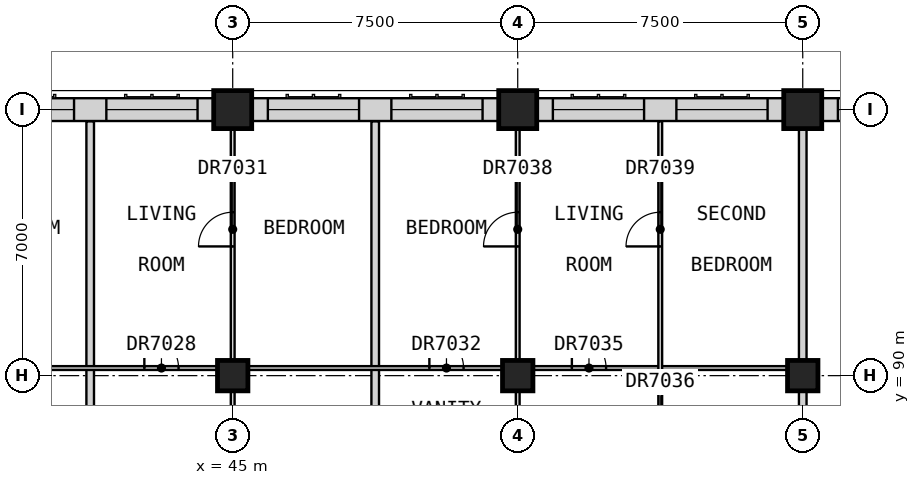
"""IFC4 building model, lengths in metres.
Left out: names, types, materials, properties, quantities, classifications, styles, units other than length and angle.
Written with IfcOpenShell. Run it as: python <this file> out.ifc"""

import sys

from ifc_helpers import new_model, si_unit, direction, frame, frame_2d, origin, origin_2d, place, context, subcontext, project, spatial, rectangle, extrude, element, fill, save


model = new_model("IFC4")
c1 = context("Model", 3, precision=1e-05, world=origin(), true_north=direction((0.0, 1.0)))
c2 = subcontext(c1, "Body", "Model", "MODEL_VIEW")
j1 = project(units=[si_unit("LENGTHUNIT", "METRE"), si_unit("PLANEANGLEUNIT", "RADIAN")], contexts=[c1])
p1 = place(None, origin())
s1 = spatial("IfcSite", under=j1, at=p1, CompositionType="ELEMENT")
p2 = place(p1, origin())
s2 = spatial("IfcBuilding", under=s1, at=p2, CompositionType="ELEMENT")
p3 = place(p2, frame((0.0, 0.0, 230.2)))
s3 = spatial("IfcBuildingStorey", under=s2, at=p3, CompositionType="ELEMENT", Elevation=230.2)
p4 = place(p3, frame((45.0, 90.0, 0.0), z_axis=(0.0, 0.0, 1.0), x_axis=(1.0, 0.0, 0.0)))
e1 = element("IfcColumn", 1, at=p4, inside=s3, PredefinedType="COLUMN", context=c2, shape_type="SweptSolid", body=[
    extrude(rectangle(XDim=0.8, YDim=0.8, at=origin_2d()), origin(), (0.0, 0.0, 1.0), 3.5),
])
p5 = place(p3, frame((45.0, 97.0, 0.0), z_axis=(0.0, 0.0, 1.0), x_axis=(1.0, 0.0, 0.0)))
e2 = element("IfcColumn", 2, at=p5, inside=s3, PredefinedType="COLUMN", context=c2, shape_type="SweptSolid", body=[
    extrude(rectangle(XDim=1.0, YDim=1.0, at=origin_2d()), origin(), (0.0, 0.0, 1.0), 3.5),
])
p6 = place(p3, frame((52.5, 90.0, 0.0), z_axis=(0.0, 0.0, 1.0), x_axis=(1.0, 0.0, 0.0)))
e3 = element("IfcColumn", 3, at=p6, inside=s3, PredefinedType="COLUMN", context=c2, shape_type="SweptSolid", body=[
    extrude(rectangle(XDim=0.8, YDim=0.8, at=origin_2d()), origin(), (0.0, 0.0, 1.0), 3.5),
])
p7 = place(p3, frame((52.5, 97.0, 0.0), z_axis=(0.0, 0.0, 1.0), x_axis=(1.0, 0.0, 0.0)))
e4 = element("IfcColumn", 4, at=p7, inside=s3, PredefinedType="COLUMN", context=c2, shape_type="SweptSolid", body=[
    extrude(rectangle(XDim=1.0, YDim=1.0, at=origin_2d()), origin(), (0.0, 0.0, 1.0), 3.5),
])
p8 = place(p3, frame((60.0, 90.0, 0.0), z_axis=(0.0, 0.0, 1.0), x_axis=(1.0, 0.0, 0.0)))
e5 = element("IfcColumn", 5, at=p8, inside=s3, PredefinedType="COLUMN", context=c2, shape_type="SweptSolid", body=[
    extrude(rectangle(XDim=0.8, YDim=0.8, at=origin_2d()), origin(), (0.0, 0.0, 1.0), 3.5),
])
p9 = place(p3, frame((60.0, 97.0, 0.0), z_axis=(0.0, 0.0, 1.0), x_axis=(1.0, 0.0, 0.0)))
e6 = element("IfcColumn", 6, at=p9, inside=s3, PredefinedType="COLUMN", context=c2, shape_type="SweptSolid", body=[
    extrude(rectangle(XDim=1.0, YDim=1.0, at=origin_2d()), origin(), (0.0, 0.0, 1.0), 3.5),
])
p10 = place(p3, frame((67.0, 97.0, 0.0), z_axis=(0.0, 0.0, 1.0), x_axis=(-1.0, 0.0, 0.0)))
e7 = element("IfcWall", 7, at=p10, inside=s3, PredefinedType="SOLIDWALL", context=c2, shape_type="SweptSolid", body=[
    extrude(rectangle(XDim=6.5, YDim=0.6, at=frame_2d((3.25, 0.0))), origin(), (0.0, 0.0, 1.0), 2.75),
])
p11 = place(p10, frame((3.675, 0.0, 0.8)))
e8 = element("IfcOpeningElement", 8, at=p11, cuts=e7, PredefinedType="OPENING", context=c2, shape_type="SweptSolid", body=[
    extrude(rectangle(XDim=2.4, YDim=1.8, at=frame_2d((1.2, 0.9))), frame((0.0, 0.31, 0.0), z_axis=(0.0, -1.0, 0.0), x_axis=(1.0, 0.0, 0.0)), (0.0, 0.0, 1.0), 0.62),
])
p12 = place(p10, frame((0.425, 0.0, 0.8)))
e9 = element("IfcOpeningElement", 9, at=p12, cuts=e7, PredefinedType="OPENING", context=c2, shape_type="SweptSolid", body=[
    extrude(rectangle(XDim=2.4, YDim=1.8, at=frame_2d((1.2, 0.9))), frame((0.0, 0.31, 0.0), z_axis=(0.0, -1.0, 0.0), x_axis=(1.0, 0.0, 0.0)), (0.0, 0.0, 1.0), 0.62),
])
p13 = place(p3, frame((59.5, 97.0, 0.0), z_axis=(0.0, 0.0, 1.0), x_axis=(-1.0, 0.0, 0.0)))
e10 = element("IfcWall", 10, at=p13, inside=s3, PredefinedType="SOLIDWALL", context=c2, shape_type="SweptSolid", body=[
    extrude(rectangle(XDim=6.5, YDim=0.6, at=frame_2d((3.25, 0.0))), origin(), (0.0, 0.0, 1.0), 2.75),
])
p14 = place(p13, frame((3.675, 0.0, 0.8)))
e11 = element("IfcOpeningElement", 11, at=p14, cuts=e10, PredefinedType="OPENING", context=c2, shape_type="SweptSolid", body=[
    extrude(rectangle(XDim=2.4, YDim=1.8, at=frame_2d((1.2, 0.9))), frame((0.0, 0.31, 0.0), z_axis=(0.0, -1.0, 0.0), x_axis=(1.0, 0.0, 0.0)), (0.0, 0.0, 1.0), 0.62),
])
p15 = place(p13, frame((0.425, 0.0, 0.8)))
e12 = element("IfcOpeningElement", 12, at=p15, cuts=e10, PredefinedType="OPENING", context=c2, shape_type="SweptSolid", body=[
    extrude(rectangle(XDim=2.4, YDim=1.8, at=frame_2d((1.2, 0.9))), frame((0.0, 0.31, 0.0), z_axis=(0.0, -1.0, 0.0), x_axis=(1.0, 0.0, 0.0)), (0.0, 0.0, 1.0), 0.62),
])
p16 = place(p3, frame((52.0, 97.0, 0.0), z_axis=(0.0, 0.0, 1.0), x_axis=(-1.0, 0.0, 0.0)))
e13 = element("IfcWall", 13, at=p16, inside=s3, PredefinedType="SOLIDWALL", context=c2, shape_type="SweptSolid", body=[
    extrude(rectangle(XDim=6.5, YDim=0.6, at=frame_2d((3.25, 0.0))), origin(), (0.0, 0.0, 1.0), 2.75),
])
p17 = place(p16, frame((3.675, 0.0, 0.8)))
e14 = element("IfcOpeningElement", 14, at=p17, cuts=e13, PredefinedType="OPENING", context=c2, shape_type="SweptSolid", body=[
    extrude(rectangle(XDim=2.4, YDim=1.8, at=frame_2d((1.2, 0.9))), frame((0.0, 0.31, 0.0), z_axis=(0.0, -1.0, 0.0), x_axis=(1.0, 0.0, 0.0)), (0.0, 0.0, 1.0), 0.62),
])
p18 = place(p16, frame((0.425, 0.0, 0.8)))
e15 = element("IfcOpeningElement", 15, at=p18, cuts=e13, PredefinedType="OPENING", context=c2, shape_type="SweptSolid", body=[
    extrude(rectangle(XDim=2.4, YDim=1.8, at=frame_2d((1.2, 0.9))), frame((0.0, 0.31, 0.0), z_axis=(0.0, -1.0, 0.0), x_axis=(1.0, 0.0, 0.0)), (0.0, 0.0, 1.0), 0.62),
])
p19 = place(p3, frame((44.5, 97.0, 0.0), z_axis=(0.0, 0.0, 1.0), x_axis=(-1.0, 0.0, 0.0)))
e16 = element("IfcWall", 16, at=p19, inside=s3, PredefinedType="SOLIDWALL", context=c2, shape_type="SweptSolid", body=[
    extrude(rectangle(XDim=6.5, YDim=0.6, at=frame_2d((3.25, 0.0))), origin(), (0.0, 0.0, 1.0), 2.75),
])
p20 = place(p19, frame((3.675, 0.0, 0.8)))
e17 = element("IfcOpeningElement", 17, at=p20, cuts=e16, PredefinedType="OPENING", context=c2, shape_type="SweptSolid", body=[
    extrude(rectangle(XDim=2.4, YDim=1.8, at=frame_2d((1.2, 0.9))), frame((0.0, 0.31, 0.0), z_axis=(0.0, -1.0, 0.0), x_axis=(1.0, 0.0, 0.0)), (0.0, 0.0, 1.0), 0.62),
])
p21 = place(p19, frame((0.425, 0.0, 0.8)))
e18 = element("IfcOpeningElement", 18, at=p21, cuts=e16, PredefinedType="OPENING", context=c2, shape_type="SweptSolid", body=[
    extrude(rectangle(XDim=2.4, YDim=1.8, at=frame_2d((1.2, 0.9))), frame((0.0, 0.31, 0.0), z_axis=(0.0, -1.0, 0.0), x_axis=(1.0, 0.0, 0.0)), (0.0, 0.0, 1.0), 0.62),
])
for number, where, z_axis, x_axis in (
    (19, (41.25, 84.375, 0.0), (0.0, 0.0, 1.0), (0.0, 1.0, 0.0)),
    (20, (48.75, 84.375, 0.0), (0.0, 0.0, 1.0), (0.0, 1.0, 0.0)),
):
    element("IfcWall", number, at=place(p3, frame(where, z_axis=z_axis, x_axis=x_axis)), inside=s3, PredefinedType="PARTITIONING", context=c2, shape_type="SweptSolid", body=[
        extrude(rectangle(XDim=12.315, YDim=0.2, at=frame_2d((6.157, 0.0))), origin(), (0.0, 0.0, 1.0), 3.25),
    ])
p22 = place(p3, frame((60.0, 84.375, 0.0), z_axis=(0.0, 0.0, 1.0), x_axis=(0.0, 1.0, 0.0)))
e21 = element("IfcWall", 21, at=p22, inside=s3, PredefinedType="PARTITIONING", context=c2, shape_type="SweptSolid", body=[
    extrude(rectangle(XDim=13.125, YDim=0.2, at=frame_2d((6.562, 0.0))), origin(), (0.0, 0.0, 1.0), 3.25),
])
p23 = place(p3, frame((33.85, 90.2, 0.0), z_axis=(0.0, 0.0, 1.0), x_axis=(1.0, 0.0, 0.0)))
e22 = element("IfcWall", 22, at=p23, inside=s3, PredefinedType="PARTITIONING", context=c2, shape_type="SweptSolid", body=[
    extrude(rectangle(XDim=26.05, YDim=0.1, at=frame_2d((13.025, 0.0))), origin(), (0.0, 0.0, 1.0), 3.25),
])
p24 = place(p23, frame((0.175, 0.0, 0.0)))
e23 = element("IfcOpeningElement", 23, at=p24, cuts=e22, PredefinedType="OPENING", context=c2, shape_type="SweptSolid", body=[
    extrude(rectangle(XDim=0.9, YDim=2.1, at=frame_2d((0.45, 1.05))), frame((0.0, 0.06, 0.0), z_axis=(0.0, -1.0, 0.0), x_axis=(1.0, 0.0, 0.0)), (0.0, 0.0, 1.0), 0.12),
])
p25 = place(p23, frame((8.825, 0.0, 0.0)))
e24 = element("IfcOpeningElement", 24, at=p25, cuts=e22, PredefinedType="OPENING", context=c2, shape_type="SweptSolid", body=[
    extrude(rectangle(XDim=0.9, YDim=2.1, at=frame_2d((0.45, 1.05))), frame((0.0, 0.06, 0.0), z_axis=(0.0, -1.0, 0.0), x_axis=(1.0, 0.0, 0.0)), (0.0, 0.0, 1.0), 0.12),
])
p26 = place(p23, frame((16.325, 0.0, 0.0)))
e25 = element("IfcOpeningElement", 25, at=p26, cuts=e22, PredefinedType="OPENING", context=c2, shape_type="SweptSolid", body=[
    extrude(rectangle(XDim=0.9, YDim=2.1, at=frame_2d((0.45, 1.05))), frame((0.0, 0.06, 0.0), z_axis=(0.0, -1.0, 0.0), x_axis=(1.0, 0.0, 0.0)), (0.0, 0.0, 1.0), 0.12),
])
p27 = place(p23, frame((20.075, 0.0, 0.0)))
e26 = element("IfcOpeningElement", 26, at=p27, cuts=e22, PredefinedType="OPENING", context=c2, shape_type="SweptSolid", body=[
    extrude(rectangle(XDim=0.9, YDim=2.1, at=frame_2d((0.45, 1.05))), frame((0.0, 0.06, 0.0), z_axis=(0.0, -1.0, 0.0), x_axis=(1.0, 0.0, 0.0)), (0.0, 0.0, 1.0), 0.12),
])
p28 = place(p3, frame((45.0, 87.312, 0.0), z_axis=(0.0, 0.0, 1.0), x_axis=(0.0, 1.0, 0.0)))
e27 = element("IfcWall", 27, at=p28, inside=s3, PredefinedType="PARTITIONING", context=c2, shape_type="SweptSolid", body=[
    extrude(rectangle(XDim=10.188, YDim=0.1, at=frame_2d((5.094, 0.0))), origin(), (0.0, 0.0, 1.0), 3.25),
])
p29 = place(p28, frame((0.962, 0.0, 0.0)))
e28 = element("IfcOpeningElement", 28, at=p29, cuts=e27, PredefinedType="OPENING", context=c2, shape_type="SweptSolid", body=[
    extrude(rectangle(XDim=0.9, YDim=2.1, at=frame_2d((0.45, 1.05))), frame((0.0, 0.06, 0.0), z_axis=(0.0, -1.0, 0.0), x_axis=(1.0, 0.0, 0.0)), (0.0, 0.0, 1.0), 0.12),
])
p30 = place(p28, frame((6.087, 0.0, 0.0)))
e29 = element("IfcOpeningElement", 29, at=p30, cuts=e27, PredefinedType="OPENING", context=c2, shape_type="SweptSolid", body=[
    extrude(rectangle(XDim=0.9, YDim=2.1, at=frame_2d((0.45, 1.05))), frame((0.0, 0.06, 0.0), z_axis=(0.0, -1.0, 0.0), x_axis=(1.0, 0.0, 0.0)), (0.0, 0.0, 1.0), 0.12),
])
p31 = place(p3, frame((52.5, 87.312, 0.0), z_axis=(0.0, 0.0, 1.0), x_axis=(0.0, 1.0, 0.0)))
e30 = element("IfcWall", 30, at=p31, inside=s3, PredefinedType="PARTITIONING", context=c2, shape_type="SweptSolid", body=[
    extrude(rectangle(XDim=10.188, YDim=0.1, at=frame_2d((5.094, 0.0))), origin(), (0.0, 0.0, 1.0), 3.25),
])
p32 = place(p31, frame((6.087, 0.0, 0.0)))
e31 = element("IfcOpeningElement", 31, at=p32, cuts=e30, PredefinedType="OPENING", context=c2, shape_type="SweptSolid", body=[
    extrude(rectangle(XDim=0.9, YDim=2.1, at=frame_2d((0.45, 1.05))), frame((0.0, 0.06, 0.0), z_axis=(0.0, -1.0, 0.0), x_axis=(1.0, 0.0, 0.0)), (0.0, 0.0, 1.0), 0.12),
])
p33 = place(p3, frame((56.25, 87.312, 0.0), z_axis=(0.0, 0.0, 1.0), x_axis=(0.0, 1.0, 0.0)))
e32 = element("IfcWall", 32, at=p33, inside=s3, PredefinedType="PARTITIONING", context=c2, shape_type="SweptSolid", body=[
    extrude(rectangle(XDim=9.377, YDim=0.1, at=frame_2d((4.689, 0.0))), origin(), (0.0, 0.0, 1.0), 3.25),
])
p34 = place(p33, frame((0.962, 0.0, 0.0)))
e33 = element("IfcOpeningElement", 33, at=p34, cuts=e32, PredefinedType="OPENING", context=c2, shape_type="SweptSolid", body=[
    extrude(rectangle(XDim=0.9, YDim=2.1, at=frame_2d((0.45, 1.05))), frame((0.0, 0.06, 0.0), z_axis=(0.0, -1.0, 0.0), x_axis=(1.0, 0.0, 0.0)), (0.0, 0.0, 1.0), 0.12),
])
p35 = place(p33, frame((6.087, 0.0, 0.0)))
e34 = element("IfcOpeningElement", 34, at=p35, cuts=e32, PredefinedType="OPENING", context=c2, shape_type="SweptSolid", body=[
    extrude(rectangle(XDim=0.9, YDim=2.1, at=frame_2d((0.45, 1.05))), frame((0.0, 0.06, 0.0), z_axis=(0.0, -1.0, 0.0), x_axis=(1.0, 0.0, 0.0)), (0.0, 0.0, 1.0), 0.12),
])
p36 = place(p11, origin())
e35 = element("IfcWindow", 35, at=p36, inside=s3, PartitioningType="SINGLE_PANEL", PredefinedType="WINDOW", context=c2, shape_type="SweptSolid", body=[
    extrude(rectangle(XDim=2.4, YDim=1.8, at=frame_2d((1.2, 0.9))), frame((0.0, -0.07, 0.0), z_axis=(0.0, -1.0, 0.0), x_axis=(1.0, 0.0, 0.0)), (0.0, 0.0, 1.0), 0.06),
])
fill(e8, e35)
p37 = place(p14, origin())
e36 = element("IfcWindow", 36, at=p37, inside=s3, PartitioningType="SINGLE_PANEL", PredefinedType="WINDOW", context=c2, shape_type="SweptSolid", body=[
    extrude(rectangle(XDim=2.4, YDim=1.8, at=frame_2d((1.2, 0.9))), frame((0.0, -0.07, 0.0), z_axis=(0.0, -1.0, 0.0), x_axis=(1.0, 0.0, 0.0)), (0.0, 0.0, 1.0), 0.06),
])
fill(e11, e36)
p38 = place(p15, origin())
e37 = element("IfcWindow", 37, at=p38, inside=s3, PartitioningType="SINGLE_PANEL", PredefinedType="WINDOW", context=c2, shape_type="SweptSolid", body=[
    extrude(rectangle(XDim=2.4, YDim=1.8, at=frame_2d((1.2, 0.9))), frame((0.0, -0.07, 0.0), z_axis=(0.0, -1.0, 0.0), x_axis=(1.0, 0.0, 0.0)), (0.0, 0.0, 1.0), 0.06),
])
fill(e12, e37)
p39 = place(p17, origin())
e38 = element("IfcWindow", 38, at=p39, inside=s3, PartitioningType="SINGLE_PANEL", PredefinedType="WINDOW", context=c2, shape_type="SweptSolid", body=[
    extrude(rectangle(XDim=2.4, YDim=1.8, at=frame_2d((1.2, 0.9))), frame((0.0, -0.07, 0.0), z_axis=(0.0, -1.0, 0.0), x_axis=(1.0, 0.0, 0.0)), (0.0, 0.0, 1.0), 0.06),
])
fill(e14, e38)
p40 = place(p18, origin())
e39 = element("IfcWindow", 39, at=p40, inside=s3, PartitioningType="SINGLE_PANEL", PredefinedType="WINDOW", context=c2, shape_type="SweptSolid", body=[
    extrude(rectangle(XDim=2.4, YDim=1.8, at=frame_2d((1.2, 0.9))), frame((0.0, -0.07, 0.0), z_axis=(0.0, -1.0, 0.0), x_axis=(1.0, 0.0, 0.0)), (0.0, 0.0, 1.0), 0.06),
])
fill(e15, e39)
p41 = place(p20, origin())
e40 = element("IfcWindow", 40, at=p41, inside=s3, PartitioningType="SINGLE_PANEL", PredefinedType="WINDOW", context=c2, shape_type="SweptSolid", body=[
    extrude(rectangle(XDim=2.4, YDim=1.8, at=frame_2d((1.2, 0.9))), frame((0.0, -0.07, 0.0), z_axis=(0.0, -1.0, 0.0), x_axis=(1.0, 0.0, 0.0)), (0.0, 0.0, 1.0), 0.06),
])
fill(e17, e40)
p42 = place(p21, origin())
e41 = element("IfcWindow", 41, at=p42, inside=s3, PartitioningType="SINGLE_PANEL", PredefinedType="WINDOW", context=c2, shape_type="SweptSolid", body=[
    extrude(rectangle(XDim=2.4, YDim=1.8, at=frame_2d((1.2, 0.9))), frame((0.0, -0.07, 0.0), z_axis=(0.0, -1.0, 0.0), x_axis=(1.0, 0.0, 0.0)), (0.0, 0.0, 1.0), 0.06),
])
fill(e18, e41)
p43 = place(p25, origin())
e42 = element("IfcDoor", 42, at=p43, inside=s3, OperationType="SINGLE_SWING_RIGHT", PredefinedType="DOOR", context=c2, shape_type="SweptSolid", body=[
    extrude(rectangle(XDim=0.9, YDim=2.1, at=frame_2d((0.45, 1.05))), frame((0.0, 0.025, 0.0), z_axis=(0.0, -1.0, 0.0), x_axis=(1.0, 0.0, 0.0)), (0.0, 0.0, 1.0), 0.05),
])
fill(e24, e42)
p44 = place(p30, origin())
e43 = element("IfcDoor", 43, at=p44, inside=s3, OperationType="SINGLE_SWING_LEFT", PredefinedType="DOOR", context=c2, shape_type="SweptSolid", body=[
    extrude(rectangle(XDim=0.9, YDim=2.1, at=frame_2d((0.45, 1.05))), frame((0.0, 0.025, 0.0), z_axis=(0.0, -1.0, 0.0), x_axis=(1.0, 0.0, 0.0)), (0.0, 0.0, 1.0), 0.05),
])
fill(e29, e43)
p45 = place(p26, origin())
e44 = element("IfcDoor", 44, at=p45, inside=s3, OperationType="SINGLE_SWING_RIGHT", PredefinedType="DOOR", context=c2, shape_type="SweptSolid", body=[
    extrude(rectangle(XDim=0.9, YDim=2.1, at=frame_2d((0.45, 1.05))), frame((0.0, 0.025, 0.0), z_axis=(0.0, -1.0, 0.0), x_axis=(1.0, 0.0, 0.0)), (0.0, 0.0, 1.0), 0.05),
])
fill(e25, e44)
p46 = place(p27, origin())
e45 = element("IfcDoor", 45, at=p46, inside=s3, OperationType="SINGLE_SWING_RIGHT", PredefinedType="DOOR", context=c2, shape_type="SweptSolid", body=[
    extrude(rectangle(XDim=0.9, YDim=2.1, at=frame_2d((0.45, 1.05))), frame((0.0, 0.025, 0.0), z_axis=(0.0, -1.0, 0.0), x_axis=(1.0, 0.0, 0.0)), (0.0, 0.0, 1.0), 0.05),
])
fill(e26, e45)
p47 = place(p32, origin())
e46 = element("IfcDoor", 46, at=p47, inside=s3, OperationType="SINGLE_SWING_LEFT", PredefinedType="DOOR", context=c2, shape_type="SweptSolid", body=[
    extrude(rectangle(XDim=0.9, YDim=2.1, at=frame_2d((0.45, 1.05))), frame((0.0, 0.025, 0.0), z_axis=(0.0, -1.0, 0.0), x_axis=(1.0, 0.0, 0.0)), (0.0, 0.0, 1.0), 0.05),
])
fill(e31, e46)
p48 = place(p35, origin())
e47 = element("IfcDoor", 47, at=p48, inside=s3, OperationType="SINGLE_SWING_LEFT", PredefinedType="DOOR", context=c2, shape_type="SweptSolid", body=[
    extrude(rectangle(XDim=0.9, YDim=2.1, at=frame_2d((0.45, 1.05))), frame((0.0, 0.025, 0.0), z_axis=(0.0, -1.0, 0.0), x_axis=(1.0, 0.0, 0.0)), (0.0, 0.0, 1.0), 0.05),
])
fill(e34, e47)
save(model, sys.argv[1])
